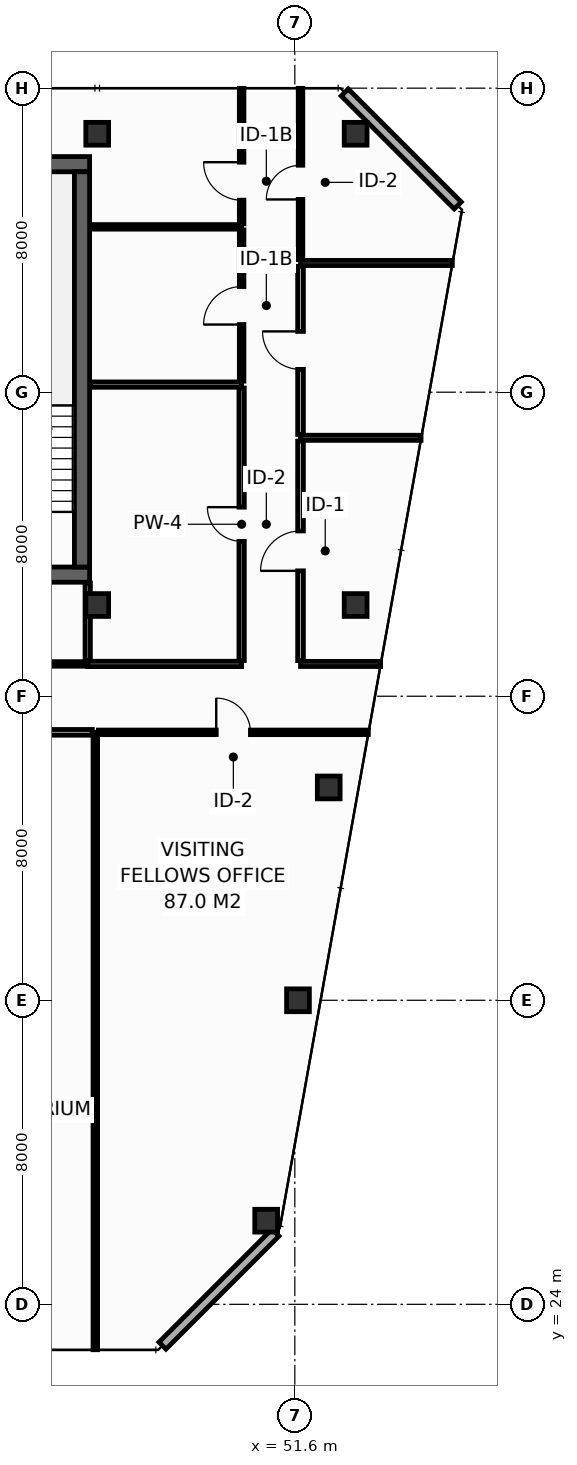
"""IFC4 building model, lengths in metres.
Left out: names, types, materials, properties, quantities, classifications, styles, units other than length and angle.
Written with IfcOpenShell. Run it as: python <this file> out.ifc"""

import sys

from ifc_helpers import new_model, si_unit, direction, frame, frame_2d, origin, origin_2d, place, context, subcontext, project, spatial, rectangle, hollow_rectangle, extrude, element, fill, save


model = new_model("IFC4")
c1 = context("Model", 3, precision=1e-05, world=origin(), true_north=direction((0.0, 1.0)))
c2 = subcontext(c1, "Body", "Model", "MODEL_VIEW")
j1 = project(units=[si_unit("LENGTHUNIT", "METRE"), si_unit("PLANEANGLEUNIT", "RADIAN")], contexts=[c1])
p1 = place(None, origin())
s1 = spatial("IfcSite", under=j1, at=p1, CompositionType="ELEMENT")
p2 = place(p1, origin())
s2 = spatial("IfcBuilding", under=s1, at=p2, CompositionType="ELEMENT")
p3 = place(p2, frame((0.0, 0.0, 261.0)))
s3 = spatial("IfcBuildingStorey", under=s2, at=p3, CompositionType="ELEMENT", Elevation=261.0)
p4 = place(p3, frame((13.7, 43.2, 0.0), z_axis=(0.0, 0.0, 1.0), x_axis=(1.0, 0.0, 0.0)))
e1 = element("IfcWall", 1, at=p4, inside=s3, PredefinedType="SHEAR", context=c2, shape_type="SweptSolid", body=[
    extrude(rectangle(XDim=32.5, YDim=0.4, at=frame_2d((16.25, 0.0))), origin(), (0.0, 0.0, 1.0), 3.55),
])
p5 = place(p4, frame((5.4, 0.0, 0.0)))
e2 = element("IfcOpeningElement", 2, at=p5, cuts=e1, PredefinedType="OPENING", context=c2, shape_type="SweptSolid", body=[
    extrude(rectangle(XDim=1.1, YDim=2.15, at=frame_2d((0.55, 1.075))), frame((0.0, 0.21, 0.0), z_axis=(0.0, -1.0, 0.0), x_axis=(1.0, 0.0, 0.0)), (0.0, 0.0, 1.0), 0.42),
])
p6 = place(p4, frame((25.6, 0.0, 0.0)))
e3 = element("IfcOpeningElement", 3, at=p6, cuts=e1, PredefinedType="OPENING", context=c2, shape_type="SweptSolid", body=[
    extrude(rectangle(XDim=1.1, YDim=2.15, at=frame_2d((0.55, 1.075))), frame((0.0, 0.21, 0.0), z_axis=(0.0, -1.0, 0.0), x_axis=(1.0, 0.0, 0.0)), (0.0, 0.0, 1.0), 0.42),
])
p7 = place(p3, frame((13.7, 54.0, 0.0), z_axis=(0.0, 0.0, 1.0), x_axis=(1.0, 0.0, 0.0)))
e4 = element("IfcWall", 4, at=p7, inside=s3, PredefinedType="SHEAR", context=c2, shape_type="SweptSolid", body=[
    extrude(rectangle(XDim=32.5, YDim=0.4, at=frame_2d((16.25, 0.0))), origin(), (0.0, 0.0, 1.0), 3.55),
])
p8 = place(p3, frame((46.0, 43.4, 0.0), z_axis=(0.0, 0.0, 1.0), x_axis=(0.0, 1.0, 0.0)))
e5 = element("IfcWall", 5, at=p8, inside=s3, PredefinedType="SHEAR", context=c2, shape_type="SweptSolid", body=[
    extrude(rectangle(XDim=10.4, YDim=0.4, at=frame_2d((5.2, 0.0))), origin(), (0.0, 0.0, 1.0), 3.55),
])
for number, where, z_axis, x_axis in (
    (6, (46.4, 54.8, 0.0), (0.0, 0.0, 1.0), (1.0, 0.0, 0.0)),
    (7, (53.2, 54.8, 0.0), (0.0, 0.0, 1.0), (1.0, 0.0, 0.0)),
    (8, (46.4, 42.4, 0.0), (0.0, 0.0, 1.0), (1.0, 0.0, 0.0)),
    (9, (53.2, 42.4, 0.0), (0.0, 0.0, 1.0), (1.0, 0.0, 0.0)),
    (10, (50.846, 26.2, 0.0), (0.0, 0.0, 1.0), (1.0, 0.0, 0.0)),
    (11, (51.683, 32.0, 0.0), (0.0, 0.0, 1.0), (1.0, 0.0, 0.0)),
    (12, (52.492, 37.6, 0.0), (0.0, 0.0, 1.0), (1.0, 0.0, 0.0)),
):
    element("IfcColumn", number, at=place(p3, frame(where, z_axis=z_axis, x_axis=x_axis)), inside=s3, PredefinedType="COLUMN", context=c2, shape_type="SweptSolid", body=[
        extrude(hollow_rectangle(XDim=0.6, YDim=0.6, WallThickness=0.028, at=origin_2d()), origin(), (0.0, 0.0, 1.0), 3.8),
    ])
for number, where, z_axis, x_axis in (
    (13, (48.117, 22.913, 0.0), (0.0, 0.0, 1.0), (0.707, 0.707, 0.0)),
    (14, (55.887, 52.913, 0.0), (0.0, 0.0, 1.0), (-0.707, 0.707, 0.0)),
):
    element("IfcWall", number, at=place(p3, frame(where, z_axis=z_axis, x_axis=x_axis)), inside=s3, PredefinedType="STANDARD", context=c2, shape_type="SweptSolid", body=[
        extrude(rectangle(XDim=4.206, YDim=0.26, at=frame_2d((2.103, 0.0))), origin(), (0.0, 0.0, 1.0), 3.55),
    ])
p9 = place(p3, frame((46.15, 40.85, 0.0), z_axis=(0.0, 0.0, 1.0), x_axis=(1.0, 0.0, 0.0)))
e15 = element("IfcWall", 15, at=p9, inside=s3, PredefinedType="PARTITIONING", context=c2, shape_type="SweptSolid", body=[
    extrude(rectangle(XDim=4.05, YDim=0.14, at=frame_2d((2.025, 0.0))), origin(), (0.0, 0.0, 1.0), 3.55),
])
p10 = place(p3, frame((46.15, 40.94, 0.0), z_axis=(0.0, 0.0, 1.0), x_axis=(0.0, 1.0, 0.0)))
e16 = element("IfcWall", 16, at=p10, inside=s3, PredefinedType="PARTITIONING", context=c2, shape_type="SweptSolid", body=[
    extrude(rectangle(XDim=2.04, YDim=0.14, at=frame_2d((1.02, 0.0))), origin(), (0.0, 0.0, 1.0), 3.55),
])
p11 = place(p3, frame((46.22, 48.2, 0.0), z_axis=(0.0, 0.0, 1.0), x_axis=(1.0, 0.0, 0.0)))
e17 = element("IfcWall", 17, at=p11, inside=s3, PredefinedType="PARTITIONING", context=c2, shape_type="SweptSolid", body=[
    extrude(rectangle(XDim=3.98, YDim=0.14, at=frame_2d((1.99, 0.0))), origin(), (0.0, 0.0, 1.0), 3.55),
])
p12 = place(p3, frame((50.2, 40.94, 0.0), z_axis=(0.0, 0.0, 1.0), x_axis=(0.0, 1.0, 0.0)))
e18 = element("IfcWall", 18, at=p12, inside=s3, PredefinedType="PARTITIONING", context=c2, shape_type="SweptSolid", body=[
    extrude(rectangle(XDim=7.17, YDim=0.14, at=frame_2d((3.585, 0.0))), origin(), (0.0, 0.0, 1.0), 2.947),
])
p13 = place(p12, frame((3.135, 0.0, 0.0)))
e19 = element("IfcOpeningElement", 19, at=p13, cuts=e18, PredefinedType="OPENING", context=c2, shape_type="SweptSolid", body=[
    extrude(rectangle(XDim=0.9, YDim=2.1, at=frame_2d((0.45, 1.05))), frame((0.0, 0.08, 0.0), z_axis=(0.0, -1.0, 0.0), x_axis=(1.0, 0.0, 0.0)), (0.0, 0.0, 1.0), 0.16),
])
p14 = place(p3, frame((46.22, 52.35, 0.0), z_axis=(0.0, 0.0, 1.0), x_axis=(1.0, 0.0, 0.0)))
e20 = element("IfcWall", 20, at=p14, inside=s3, PredefinedType="PARTITIONING", context=c2, shape_type="SweptSolid", body=[
    extrude(rectangle(XDim=3.98, YDim=0.12, at=frame_2d((1.99, 0.0))), origin(), (0.0, 0.0, 1.0), 3.55),
])
p15 = place(p3, frame((50.2, 48.29, 0.0), z_axis=(0.0, 0.0, 1.0), x_axis=(0.0, 1.0, 0.0)))
e21 = element("IfcWall", 21, at=p15, inside=s3, PredefinedType="PARTITIONING", context=c2, shape_type="SweptSolid", body=[
    extrude(rectangle(XDim=3.98, YDim=0.12, at=frame_2d((1.99, 0.0))), origin(), (0.0, 0.0, 1.0), 3.55),
])
p16 = place(p15, frame((1.49, 0.0, 0.0)))
e22 = element("IfcOpeningElement", 22, at=p16, cuts=e21, PredefinedType="OPENING", context=c2, shape_type="SweptSolid", body=[
    extrude(rectangle(XDim=1.0, YDim=2.15, at=frame_2d((0.5, 1.075))), frame((0.0, 0.07, 0.0), z_axis=(0.0, -1.0, 0.0), x_axis=(1.0, 0.0, 0.0)), (0.0, 0.0, 1.0), 0.14),
])
p17 = place(p3, frame((50.2, 52.43, 0.0), z_axis=(0.0, 0.0, 1.0), x_axis=(0.0, 1.0, 0.0)))
e23 = element("IfcWall", 23, at=p17, inside=s3, PredefinedType="PARTITIONING", context=c2, shape_type="SweptSolid", body=[
    extrude(rectangle(XDim=3.565, YDim=0.12, at=frame_2d((1.783, 0.0))), origin(), (0.0, 0.0, 1.0), 2.935),
])
p18 = place(p17, frame((0.622, 0.0, 0.0)))
e24 = element("IfcOpeningElement", 24, at=p18, cuts=e23, PredefinedType="OPENING", context=c2, shape_type="SweptSolid", body=[
    extrude(rectangle(XDim=1.0, YDim=2.15, at=frame_2d((0.5, 1.075))), frame((0.0, 0.07, 0.0), z_axis=(0.0, -1.0, 0.0), x_axis=(1.0, 0.0, 0.0)), (0.0, 0.0, 1.0), 0.14),
])
p19 = place(p3, frame((51.75, 40.85, 0.0), z_axis=(0.0, 0.0, 1.0), x_axis=(1.0, 0.0, 0.0)))
e25 = element("IfcWall", 25, at=p19, inside=s3, PredefinedType="PARTITIONING", context=c2, shape_type="SweptSolid", body=[
    extrude(rectangle(XDim=2.107, YDim=0.135, at=frame_2d((1.053, 0.0))), origin(), (0.0, 0.0, 1.0), 3.085),
])
p20 = place(p3, frame((51.75, 46.8, 0.0), z_axis=(0.0, 0.0, 1.0), x_axis=(1.0, 0.0, 0.0)))
e26 = element("IfcWall", 26, at=p20, inside=s3, PredefinedType="PARTITIONING", context=c2, shape_type="SweptSolid", body=[
    extrude(rectangle(XDim=3.171, YDim=0.135, at=frame_2d((1.586, 0.0))), origin(), (0.0, 0.0, 1.0), 2.947),
])
p21 = place(p3, frame((51.75, 51.4, 0.0), z_axis=(0.0, 0.0, 1.0), x_axis=(1.0, 0.0, 0.0)))
e27 = element("IfcWall", 27, at=p21, inside=s3, PredefinedType="PARTITIONING", context=c2, shape_type="SweptSolid", body=[
    extrude(rectangle(XDim=3.994, YDim=0.135, at=frame_2d((1.997, 0.0))), origin(), (0.0, 0.0, 1.0), 2.947),
])
p22 = place(p3, frame((51.75, 40.938, 0.0), z_axis=(0.0, 0.0, 1.0), x_axis=(0.0, 1.0, 0.0)))
e28 = element("IfcWall", 28, at=p22, inside=s3, PredefinedType="PARTITIONING", context=c2, shape_type="SweptSolid", body=[
    extrude(rectangle(XDim=5.775, YDim=0.15, at=frame_2d((2.887, 0.0))), origin(), (0.0, 0.0, 1.0), 2.947),
])
p23 = place(p22, frame((2.362, 0.0, 0.0)))
e29 = element("IfcOpeningElement", 29, at=p23, cuts=e28, PredefinedType="OPENING", context=c2, shape_type="SweptSolid", body=[
    extrude(rectangle(XDim=1.05, YDim=2.15, at=frame_2d((0.525, 1.075))), frame((0.0, 0.085, 0.0), z_axis=(0.0, -1.0, 0.0), x_axis=(1.0, 0.0, 0.0)), (0.0, 0.0, 1.0), 0.17),
])
p24 = place(p3, frame((51.75, 46.887, 0.0), z_axis=(0.0, 0.0, 1.0), x_axis=(0.0, 1.0, 0.0)))
e30 = element("IfcWall", 30, at=p24, inside=s3, PredefinedType="PARTITIONING", context=c2, shape_type="SweptSolid", body=[
    extrude(rectangle(XDim=4.425, YDim=0.15, at=frame_2d((2.212, 0.0))), origin(), (0.0, 0.0, 1.0), 3.55),
])
p25 = place(p24, frame((1.712, 0.0, 0.0)))
e31 = element("IfcOpeningElement", 31, at=p25, cuts=e30, PredefinedType="OPENING", context=c2, shape_type="SweptSolid", body=[
    extrude(rectangle(XDim=1.0, YDim=2.15, at=frame_2d((0.5, 1.075))), frame((0.0, 0.085, 0.0), z_axis=(0.0, -1.0, 0.0), x_axis=(1.0, 0.0, 0.0)), (0.0, 0.0, 1.0), 0.17),
])
p26 = place(p3, frame((51.75, 51.488, 0.0), z_axis=(0.0, 0.0, 1.0), x_axis=(0.0, 1.0, 0.0)))
e32 = element("IfcWall", 32, at=p26, inside=s3, PredefinedType="PARTITIONING", context=c2, shape_type="SweptSolid", body=[
    extrude(rectangle(XDim=4.508, YDim=0.12, at=frame_2d((2.254, 0.0))), origin(), (0.0, 0.0, 1.0), 2.935),
])
p27 = place(p26, frame((1.584, 0.0, 0.0)))
e33 = element("IfcOpeningElement", 33, at=p27, cuts=e32, PredefinedType="OPENING", context=c2, shape_type="SweptSolid", body=[
    extrude(rectangle(XDim=0.9, YDim=2.1, at=frame_2d((0.45, 1.05))), frame((0.0, 0.07, 0.0), z_axis=(0.0, -1.0, 0.0), x_axis=(1.0, 0.0, 0.0)), (0.0, 0.0, 1.0), 0.14),
])
p28 = place(p3, frame((40.995, 40.85, 0.0), z_axis=(0.0, 0.0, 1.0), x_axis=(1.0, 0.0, 0.0)))
e34 = element("IfcWall", 34, at=p28, inside=s3, PredefinedType="PARTITIONING", context=c2, shape_type="SweptSolid", body=[
    extrude(rectangle(XDim=5.155, YDim=0.12, at=frame_2d((2.577, 0.0))), origin(), (0.0, 0.0, 1.0), 3.55),
])
p29 = place(p28, frame((2.078, 0.0, 0.0)))
e35 = element("IfcOpeningElement", 35, at=p29, cuts=e34, PredefinedType="OPENING", context=c2, shape_type="SweptSolid", body=[
    extrude(rectangle(XDim=1.0, YDim=2.15, at=frame_2d((0.5, 1.075))), frame((0.0, 0.07, 0.0), z_axis=(0.0, -1.0, 0.0), x_axis=(1.0, 0.0, 0.0)), (0.0, 0.0, 1.0), 0.14),
])
p30 = place(p3, frame((46.35, 22.805, 0.0), z_axis=(0.0, 0.0, 1.0), x_axis=(0.0, 1.0, 0.0)))
e36 = element("IfcWall", 36, at=p30, inside=s3, PredefinedType="PARTITIONING", context=c2, shape_type="SweptSolid", body=[
    extrude(rectangle(XDim=16.245, YDim=0.12, at=frame_2d((8.123, 0.0))), origin(), (0.0, 0.0, 1.0), 2.947),
])
p31 = place(p3, frame((40.208, 39.05, 0.0), z_axis=(0.0, 0.0, 1.0), x_axis=(1.0, 0.0, 0.0)))
e37 = element("IfcWall", 37, at=p31, inside=s3, PredefinedType="PARTITIONING", context=c2, shape_type="SweptSolid", body=[
    extrude(rectangle(XDim=6.062, YDim=0.15, at=frame_2d((3.031, 0.0))), origin(), (0.0, 0.0, 1.0), 3.55),
])
p32 = place(p31, frame((2.531, 0.0, 0.0)))
e38 = element("IfcOpeningElement", 38, at=p32, cuts=e37, PredefinedType="OPENING", context=c2, shape_type="SweptSolid", body=[
    extrude(rectangle(XDim=1.0, YDim=2.15, at=frame_2d((0.5, 1.075))), frame((0.0, 0.085, 0.0), z_axis=(0.0, -1.0, 0.0), x_axis=(1.0, 0.0, 0.0)), (0.0, 0.0, 1.0), 0.17),
])
p33 = place(p3, frame((46.43, 39.05, 0.0), z_axis=(0.0, 0.0, 1.0), x_axis=(1.0, 0.0, 0.0)))
e39 = element("IfcWall", 39, at=p33, inside=s3, PredefinedType="PARTITIONING", context=c2, shape_type="SweptSolid", body=[
    extrude(rectangle(XDim=7.104, YDim=0.12, at=frame_2d((3.552, 0.0))), origin(), (0.0, 0.0, 1.0), 3.085),
])
p34 = place(p33, frame((3.102, 0.0, 0.0)))
e40 = element("IfcOpeningElement", 40, at=p34, cuts=e39, PredefinedType="OPENING", context=c2, shape_type="SweptSolid", body=[
    extrude(rectangle(XDim=0.9, YDim=2.1, at=frame_2d((0.45, 1.05))), frame((0.0, 0.07, 0.0), z_axis=(0.0, -1.0, 0.0), x_axis=(1.0, 0.0, 0.0)), (0.0, 0.0, 1.0), 0.14),
])
p35 = place(p13, origin())
e41 = element("IfcDoor", 41, at=p35, inside=s3, OperationType="SINGLE_SWING_RIGHT", PredefinedType="DOOR", context=c2, shape_type="SweptSolid", body=[
    extrude(rectangle(XDim=0.9, YDim=2.1, at=frame_2d((0.45, 1.05))), frame((0.0, 0.025, 0.0), z_axis=(0.0, -1.0, 0.0), x_axis=(1.0, 0.0, 0.0)), (0.0, 0.0, 1.0), 0.05),
])
fill(e19, e41)
p36 = place(p16, origin())
e42 = element("IfcDoor", 42, at=p36, inside=s3, OperationType="SINGLE_SWING_LEFT", PredefinedType="DOOR", context=c2, shape_type="SweptSolid", body=[
    extrude(rectangle(XDim=1.0, YDim=2.15, at=frame_2d((0.5, 1.075))), frame((0.0, 0.025, 0.0), z_axis=(0.0, -1.0, 0.0), x_axis=(1.0, 0.0, 0.0)), (0.0, 0.0, 1.0), 0.05),
])
fill(e22, e42)
p37 = place(p18, origin())
e43 = element("IfcDoor", 43, at=p37, inside=s3, OperationType="SINGLE_SWING_RIGHT", PredefinedType="DOOR", context=c2, shape_type="SweptSolid", body=[
    extrude(rectangle(XDim=1.0, YDim=2.15, at=frame_2d((0.5, 1.075))), frame((0.0, 0.025, 0.0), z_axis=(0.0, -1.0, 0.0), x_axis=(1.0, 0.0, 0.0)), (0.0, 0.0, 1.0), 0.05),
])
fill(e24, e43)
p38 = place(p23, origin())
e44 = element("IfcDoor", 44, at=p38, inside=s3, OperationType="SINGLE_SWING_LEFT", PredefinedType="DOOR", context=c2, shape_type="SweptSolid", body=[
    extrude(rectangle(XDim=1.05, YDim=2.15, at=frame_2d((0.525, 1.075))), frame((0.0, 0.025, 0.0), z_axis=(0.0, -1.0, 0.0), x_axis=(1.0, 0.0, 0.0)), (0.0, 0.0, 1.0), 0.05),
])
fill(e29, e44)
p39 = place(p25, origin())
e45 = element("IfcDoor", 45, at=p39, inside=s3, OperationType="SINGLE_SWING_RIGHT", PredefinedType="DOOR", context=c2, shape_type="SweptSolid", body=[
    extrude(rectangle(XDim=1.0, YDim=2.15, at=frame_2d((0.5, 1.075))), frame((0.0, 0.025, 0.0), z_axis=(0.0, -1.0, 0.0), x_axis=(1.0, 0.0, 0.0)), (0.0, 0.0, 1.0), 0.05),
])
fill(e31, e45)
p40 = place(p27, origin())
e46 = element("IfcDoor", 46, at=p40, inside=s3, OperationType="SINGLE_SWING_LEFT", PredefinedType="DOOR", context=c2, shape_type="SweptSolid", body=[
    extrude(rectangle(XDim=0.9, YDim=2.1, at=frame_2d((0.45, 1.05))), frame((0.0, 0.025, 0.0), z_axis=(0.0, -1.0, 0.0), x_axis=(1.0, 0.0, 0.0)), (0.0, 0.0, 1.0), 0.05),
])
fill(e33, e46)
p41 = place(p34, origin())
e47 = element("IfcDoor", 47, at=p41, inside=s3, OperationType="SINGLE_SWING_LEFT", PredefinedType="DOOR", context=c2, shape_type="SweptSolid", body=[
    extrude(rectangle(XDim=0.9, YDim=2.1, at=frame_2d((0.45, 1.05))), frame((0.0, 0.025, 0.0), z_axis=(0.0, -1.0, 0.0), x_axis=(1.0, 0.0, 0.0)), (0.0, 0.0, 1.0), 0.05),
])
fill(e40, e47)
save(model, sys.argv[1])
